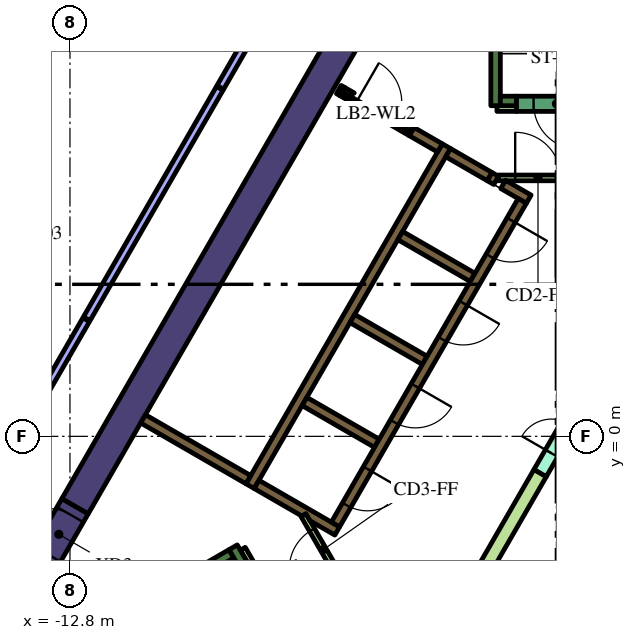
"""IFC4 building model, lengths in metres.
Left out: names, types, materials, properties, quantities, classifications, styles, units other than length and angle.
Written with IfcOpenShell. Run it as: python <this file> out.ifc"""

import sys

from ifc_helpers import new_model, si_unit, direction, frame, frame_2d, origin, place, context, subcontext, project, spatial, polyline, rectangle, outline, extrude, element, fill, save


model = new_model("IFC4")
c1 = context("Model", 3, precision=1e-05, world=origin(), true_north=direction((0.0, 1.0)))
c2 = subcontext(c1, "Body", "Model", "MODEL_VIEW")
j1 = project(units=[si_unit("LENGTHUNIT", "METRE"), si_unit("PLANEANGLEUNIT", "RADIAN")], contexts=[c1])
p1 = place(None, origin())
s1 = spatial("IfcSite", under=j1, at=p1, CompositionType="ELEMENT")
p2 = place(p1, origin())
s2 = spatial("IfcBuilding", under=s1, at=p2, CompositionType="ELEMENT")
p3 = place(p2, frame((0.0, 0.0, 179.4)))
s3 = spatial("IfcBuildingStorey", under=s2, at=p3, CompositionType="ELEMENT", Elevation=179.4)
p4 = place(p3, frame((-13.518, -3.314, 0.0), z_axis=(0.0, 0.0, 1.0), x_axis=(-0.499969377405, -0.866043083026, 0.0)))
e1 = element("IfcWall", 1, at=p4, inside=s3, PredefinedType="SOLIDWALL", context=c2, shape_type="SweptSolid", body=[
    extrude(rectangle(XDim=2.824, YDim=0.8, at=frame_2d((1.412, 0.0))), origin(), (0.0, 0.0, 1.0), 4.2),
])
p5 = place(p3, frame((-12.668, -1.842, 0.0), z_axis=(0.0, 0.0, 1.0), x_axis=(0.500003640647, 0.866023301845, 0.0)))
e2 = element("IfcWall", 2, at=p5, inside=s3, PredefinedType="SOLIDWALL", context=c2, shape_type="SweptSolid", body=[
    extrude(rectangle(XDim=15.858, YDim=0.8, at=frame_2d((7.929, 0.0))), origin(), (0.0, 0.0, 1.0), 4.2),
])
p6 = place(p3, frame((-1.6, 8.7, 0.0), z_axis=(0.0, 0.0, 1.0), x_axis=(0.0, 1.0, 0.0)))
e3 = element("IfcWall", 3, at=p6, inside=s3, PredefinedType="SOLIDWALL", context=c2, shape_type="SweptSolid", body=[
    extrude(rectangle(XDim=7.05, YDim=0.25, at=frame_2d((3.525, 0.0))), origin(), (0.0, 0.0, 1.0), 4.2),
])
p7 = place(p3, frame((-1.475, 8.825, 0.0), z_axis=(0.0, 0.0, 1.0), x_axis=(1.0, 0.0, 0.0)))
e4 = element("IfcWall", 4, at=p7, inside=s3, PredefinedType="SOLIDWALL", context=c2, shape_type="SweptSolid", body=[
    extrude(rectangle(XDim=0.425, YDim=0.25, at=frame_2d((0.212, 0.0))), origin(), (0.0, 0.0, 1.0), 4.2),
])
p8 = place(p3, frame((-14.44, -6.49, 0.0), z_axis=(0.0, 0.0, 1.0), x_axis=(0.866022966069, 0.500004222222, 0.0)))
e5 = element("IfcWall", 5, at=p8, inside=s3, PredefinedType="SOLIDWALL", context=c2, shape_type="SweptSolid", body=[
    extrude(rectangle(XDim=6.8, YDim=0.25, at=frame_2d((3.4, 0.0))), origin(), (0.0, 0.0, 1.0), 4.2),
])
p9 = place(p3, frame((-8.168, -3.503, 0.0), z_axis=(0.0, 0.0, 1.0), x_axis=(-0.499952099219, 0.866053057547, 0.0)))
e6 = element("IfcWall", 6, at=p9, inside=s3, PredefinedType="SOLIDWALL", context=c2, shape_type="SweptSolid", body=[
    extrude(rectangle(XDim=0.675, YDim=0.25, at=frame_2d((0.337, 0.0))), origin(), (0.0, 0.0, 1.0), 4.2),
])
p10 = place(p3, frame((-8.06, -1.311, 0.0), z_axis=(0.0, 0.0, 1.0), x_axis=(0.50000273126, 0.866023826885, 0.0)))
e7 = element("IfcWall", 7, at=p10, inside=s3, PredefinedType="SOLIDWALL", context=c2, shape_type="SweptSolid", body=[
    extrude(rectangle(XDim=10.33, YDim=0.25, at=frame_2d((5.165, 0.0))), origin(), (0.0, 0.0, 1.0), 4.2),
])
p11 = place(p3, frame((-1.758, 6.835, 0.0), z_axis=(0.0, 0.0, 1.0), x_axis=(0.865982457891, -0.500074377092, 0.0)))
e8 = element("IfcWall", 8, at=p11, inside=s3, PredefinedType="SOLIDWALL", context=c2, shape_type="SweptSolid", body=[
    extrude(rectangle(XDim=0.2, YDim=0.25, at=frame_2d((0.1, 0.0))), origin(), (0.0, 0.0, 1.0), 4.2),
])
p12 = place(p3, frame((-1.76, 6.836, 0.0), z_axis=(0.0, 0.0, 1.0), x_axis=(-0.865952863304, 0.500125622755, 0.0)))
e9 = element("IfcWall", 9, at=p12, inside=s3, PredefinedType="SOLIDWALL", context=c2, shape_type="SweptSolid", body=[
    extrude(rectangle(XDim=1.258, YDim=0.25, at=frame_2d((0.629, 0.0))), origin(), (0.0, 0.0, 1.0), 4.2),
])
p13 = place(p3, frame((-0.728, 6.24, 0.0), z_axis=(0.0, 0.0, 1.0), x_axis=(-0.865955664968, 0.500120771724, 0.0)))
e10 = element("IfcWall", 10, at=p13, inside=s3, PredefinedType="SOLIDWALL", context=c2, shape_type="SweptSolid", body=[
    extrude(rectangle(XDim=0.778, YDim=0.25, at=frame_2d((0.389, 0.0))), origin(), (0.0, 0.0, 1.0), 4.2),
])
for number, where, z_axis, x_axis in (
    (11, (-2.204, 4.182, 0.0), (0.0, 0.0, 1.0), (-0.866, 0.5, 0.0)),
    (12, (-5.369, 3.1, 0.0), (0.0, 0.0, 1.0), (0.866, -0.5, 0.0)),
    (13, (-4.724, -0.182, 0.0), (0.0, 0.0, 1.0), (-0.866, 0.5, 0.0)),
):
    element("IfcWall", number, at=place(p3, frame(where, z_axis=z_axis, x_axis=x_axis)), inside=s3, PredefinedType="SOLIDWALL", context=c2, shape_type="SweptSolid", body=[
        extrude(rectangle(XDim=2.2, YDim=0.25, at=frame_2d((1.1, 0.0))), origin(), (0.0, 0.0, 1.0), 4.2),
    ])
p14 = place(p3, origin())
e14 = element("IfcWall", 14, at=p14, inside=s3, PredefinedType="SOLIDWALL", context=c2, shape_type="SweptSolid", body=[
    extrude(outline(polyline([(-5.922, -2.257), (-5.922, -2.257), (-5.705, -2.382), (-5.83, -2.598), (-6.483, -2.221), (-6.591, -2.033), (-6.591, -2.033), (-6.7, -2.096), (-7.952, -1.373), (-7.827, -1.156), (-5.922, -2.257)])), origin(), (0.0, 0.0, 1.0), 4.2),
])
p15 = place(p3, frame((-8.106, -1.14, 0.0), z_axis=(0.0, 0.0, 1.0), x_axis=(-0.866008981251, 0.500028443584, 0.0)))
e15 = element("IfcWall", 15, at=p15, inside=s3, PredefinedType="SOLIDWALL", context=c2, shape_type="SweptSolid", body=[
    extrude(rectangle(XDim=3.2, YDim=0.25, at=frame_2d((1.6, 0.0))), origin(), (0.0, 0.0, 1.0), 4.2),
])
p16 = place(p3, frame((-5.725, 9.125, 0.0), z_axis=(0.0, 0.0, 1.0), x_axis=(0.866185586049, -0.49972245349, 0.0)))
e16 = element("IfcWall", 16, at=p16, inside=s3, PredefinedType="SOLIDWALL", context=c2, shape_type="SweptSolid", body=[
    extrude(rectangle(XDim=0.11, YDim=0.25, at=frame_2d((0.055, 0.0))), origin(), (0.0, 0.0, 1.0), 4.2),
])
p17 = place(p3, frame((-3.066, 7.59, 0.0), z_axis=(0.0, 0.0, 1.0), x_axis=(-0.866081358704, 0.49990307071, 0.0)))
e17 = element("IfcWall", 17, at=p17, inside=s3, PredefinedType="SOLIDWALL", context=c2, shape_type="SweptSolid", body=[
    extrude(rectangle(XDim=0.858, YDim=0.25, at=frame_2d((0.429, 0.0))), origin(), (0.0, 0.0, 1.0), 4.2),
])
e18 = element("IfcWall", 18, at=p14, inside=s3, PredefinedType="SOLIDWALL", context=c2, shape_type="SweptSolid", body=[
    extrude(outline(polyline([(-3.748, 8.128), (-3.813, 8.015), (-4.027, 8.139), (-4.017, 8.156), (-4.008, 8.173), (-4.0, 8.192), (-3.995, 8.21), (-3.991, 8.23), (-3.99, 8.25), (-3.99, 8.268), (-3.748, 8.128)])), origin(), (0.0, 0.0, 1.0), 4.2),
])
e19 = element("IfcWall", 19, at=p14, inside=s3, PredefinedType="SOLIDWALL", context=c2, shape_type="SweptSolid", body=[
    extrude(outline(polyline([(-5.689, 8.96), (-5.69, 8.961), (-5.565, 9.177), (-5.319, 9.035), (-5.335, 9.026), (-5.351, 9.015), (-5.366, 9.002), (-5.379, 8.988), (-5.392, 8.972), (-5.402, 8.956), (-5.412, 8.939), (-5.629, 9.064), (-5.629, 9.064), (-5.689, 8.96)])), origin(), (0.0, 0.0, 1.0), 4.2),
])
for number, where, z_axis, x_axis in (
    (20, (-8.252, -2.958, 0.0), (0.0, 0.0, 1.0), (0.5, -0.866, 0.0)),
    (21, (-1.564, 8.625, 0.0), (0.0, 0.0, 1.0), (1.0, 0.0, 0.0)),
):
    element("IfcWall", number, at=place(p3, frame(where, z_axis=z_axis, x_axis=x_axis)), inside=s3, PredefinedType="PARTITIONING", context=c2, shape_type="SweptSolid", body=[
        extrude(rectangle(XDim=0.514, YDim=0.15, at=frame_2d((0.257, 0.0))), origin(), (0.0, 0.0, 1.0), 3.15),
    ])
e22 = element("IfcWall", 22, at=p14, inside=s3, PredefinedType="PARTITIONING", context=c2, shape_type="SweptSolid", body=[
    extrude(outline(polyline([(-0.59, -0.872), (-0.265, -1.059), (-1.822, -3.756), (-2.147, -3.568), (-0.59, -0.872)])), origin(), (0.0, 0.0, 1.0), 3.15),
])
p18 = place(p3, frame((-0.898, 6.194, 0.0), z_axis=(0.0, 0.0, 1.0), x_axis=(-0.499996202215, -0.866027596426, 0.0)))
e23 = element("IfcWall", 23, at=p18, inside=s3, PredefinedType="SOLIDWALL", context=c2, shape_type="SweptSolid", body=[
    extrude(rectangle(XDim=9.83, YDim=0.25, at=frame_2d((4.915, 0.0))), origin(), (0.0, 0.0, 1.0), 4.2),
])
p19 = place(p18, frame((0.585, 0.0, 0.0)))
e24 = element("IfcOpeningElement", 24, at=p19, cuts=e23, PredefinedType="OPENING", context=c2, shape_type="SweptSolid", body=[
    extrude(rectangle(XDim=1.1, YDim=2.1, at=frame_2d((0.55, 1.05))), frame((0.0, 0.135, 0.0), z_axis=(0.0, -1.0, 0.0), x_axis=(1.0, 0.0, 0.0)), (0.0, 0.0, 1.0), 0.27),
])
p20 = place(p18, frame((3.105, 0.0, 0.0)))
e25 = element("IfcOpeningElement", 25, at=p20, cuts=e23, PredefinedType="OPENING", context=c2, shape_type="SweptSolid", body=[
    extrude(rectangle(XDim=1.1, YDim=2.1, at=frame_2d((0.55, 1.05))), frame((0.0, 0.135, 0.0), z_axis=(0.0, -1.0, 0.0), x_axis=(1.0, 0.0, 0.0)), (0.0, 0.0, 1.0), 0.27),
])
p21 = place(p18, frame((5.625, 0.0, 0.0)))
e26 = element("IfcOpeningElement", 26, at=p21, cuts=e23, PredefinedType="OPENING", context=c2, shape_type="SweptSolid", body=[
    extrude(rectangle(XDim=1.1, YDim=2.1, at=frame_2d((0.55, 1.05))), frame((0.0, 0.135, 0.0), z_axis=(0.0, -1.0, 0.0), x_axis=(1.0, 0.0, 0.0)), (0.0, 0.0, 1.0), 0.27),
])
p22 = place(p18, frame((8.145, 0.0, 0.0)))
e27 = element("IfcOpeningElement", 27, at=p22, cuts=e23, PredefinedType="OPENING", context=c2, shape_type="SweptSolid", body=[
    extrude(rectangle(XDim=1.1, YDim=2.1, at=frame_2d((0.55, 1.05))), frame((0.0, 0.135, 0.0), z_axis=(0.0, -1.0, 0.0), x_axis=(1.0, 0.0, 0.0)), (0.0, 0.0, 1.0), 0.27),
])
p23 = place(p3, frame((1.05, 8.75, 0.0), z_axis=(0.0, 0.0, 1.0), x_axis=(-1.0, 0.0, 0.0)))
e28 = element("IfcWall", 28, at=p23, inside=s3, PredefinedType="SOLIDWALL", context=c2, shape_type="SweptSolid", body=[
    extrude(rectangle(XDim=2.1, YDim=0.4, at=frame_2d((1.05, 0.0))), origin(), (0.0, 0.0, 1.0), 4.2),
])
p24 = place(p23, frame((0.45, 0.0, 0.0)))
e29 = element("IfcOpeningElement", 29, at=p24, cuts=e28, PredefinedType="OPENING", context=c2, shape_type="SweptSolid", body=[
    extrude(rectangle(XDim=1.2, YDim=2.1, at=frame_2d((0.6, 1.05))), frame((0.0, 0.21, 0.0), z_axis=(0.0, -1.0, 0.0), x_axis=(1.0, 0.0, 0.0)), (0.0, 0.0, 1.0), 0.42),
])
p25 = place(p3, frame((-0.427, -0.966, 0.0), z_axis=(0.0, 0.0, 1.0), x_axis=(0.49994051562, 0.866059744384, 0.0)))
e30 = element("IfcWall", 30, at=p25, inside=s3, PredefinedType="PARTITIONING", context=c2, shape_type="SweptSolid", body=[
    extrude(rectangle(XDim=2.1, YDim=0.375, at=frame_2d((1.05, 0.0))), origin(), (0.0, 0.0, 1.0), 3.15),
])
p26 = place(p25, frame((0.6, 0.0, 0.0)))
e31 = element("IfcOpeningElement", 31, at=p26, cuts=e30, PredefinedType="OPENING", context=c2, shape_type="SweptSolid", body=[
    extrude(rectangle(XDim=0.9, YDim=2.1, at=frame_2d((0.45, 1.05))), frame((0.0, 0.198, 0.0), z_axis=(0.0, -1.0, 0.0), x_axis=(1.0, 0.0, 0.0)), (0.0, 0.0, 1.0), 0.395),
])
p27 = place(p3, frame((-1.534, 6.8, 0.0), z_axis=(0.0, 0.0, 1.0), x_axis=(1.0, 0.0, 0.0)))
e32 = element("IfcWall", 32, at=p27, inside=s3, PredefinedType="PARTITIONING", context=c2, shape_type="SweptSolid", body=[
    extrude(rectangle(XDim=2.1, YDim=0.15, at=frame_2d((1.05, 0.0))), origin(), (0.0, 0.0, 1.0), 3.15),
])
p28 = place(p27, frame((0.45, 0.0, 0.0)))
e33 = element("IfcOpeningElement", 33, at=p28, cuts=e32, PredefinedType="OPENING", context=c2, shape_type="SweptSolid", body=[
    extrude(rectangle(XDim=1.2, YDim=2.1, at=frame_2d((0.6, 1.05))), frame((0.0, 0.085, 0.0), z_axis=(0.0, -1.0, 0.0), x_axis=(1.0, 0.0, 0.0)), (0.0, 0.0, 1.0), 0.17),
])
p29 = place(p3, frame((-5.606, -3.89, 0.0), z_axis=(0.0, 0.0, 1.0), x_axis=(-0.500027713859, 0.866009402589, 0.0)))
e34 = element("IfcWall", 34, at=p29, inside=s3, PredefinedType="PARTITIONING", context=c2, shape_type="SweptSolid", body=[
    extrude(rectangle(XDim=2.1, YDim=0.15, at=frame_2d((1.05, 0.0))), origin(), (0.0, 0.0, 1.0), 3.15),
])
p30 = place(p29, frame((0.45, 0.0, 0.0)))
e35 = element("IfcOpeningElement", 35, at=p30, cuts=e34, PredefinedType="OPENING", context=c2, shape_type="SweptSolid", body=[
    extrude(rectangle(XDim=1.2, YDim=2.1, at=frame_2d((0.6, 1.05))), frame((0.0, 0.085, 0.0), z_axis=(0.0, -1.0, 0.0), x_axis=(1.0, 0.0, 0.0)), (0.0, 0.0, 1.0), 0.17),
])
p31 = place(p3, frame((-5.659, 9.012, 0.0), z_axis=(0.0, 0.0, 1.0), x_axis=(0.866009402589, -0.500027713859, 0.0)))
e36 = element("IfcWall", 36, at=p31, inside=s3, PredefinedType="PARTITIONING", context=c2, shape_type="SweptSolid", body=[
    extrude(rectangle(XDim=2.1, YDim=0.12, at=frame_2d((1.05, 0.0))), origin(), (0.0, 0.0, 1.0), 3.15),
])
p32 = place(p31, frame((0.45, 0.0, 0.0)))
e37 = element("IfcOpeningElement", 37, at=p32, cuts=e36, PredefinedType="OPENING", context=c2, shape_type="SweptSolid", body=[
    extrude(rectangle(XDim=1.2, YDim=2.1, at=frame_2d((0.6, 1.05))), frame((0.0, 0.07, 0.0), z_axis=(0.0, -1.0, 0.0), x_axis=(1.0, 0.0, 0.0)), (0.0, 0.0, 1.0), 0.14),
])
p33 = place(p3, frame((-13.518, -3.314, 0.0), z_axis=(0.0, 0.0, 1.0), x_axis=(0.500000056704, 0.866025371046, 0.0)))
e38 = element("IfcWall", 38, at=p33, inside=s3, PredefinedType="SOLIDWALL", context=c2, shape_type="SweptSolid", body=[
    extrude(rectangle(XDim=1.7, YDim=0.8, at=frame_2d((0.85, 0.0))), origin(), (0.0, 0.0, 1.0), 4.2),
])
p34 = place(p33, frame((0.25, 0.0, 0.0)))
e39 = element("IfcOpeningElement", 39, at=p34, cuts=e38, PredefinedType="OPENING", context=c2, shape_type="SweptSolid", body=[
    extrude(rectangle(XDim=1.2, YDim=2.1, at=frame_2d((0.6, 1.05))), frame((0.0, 0.41, 0.0), z_axis=(0.0, -1.0, 0.0), x_axis=(1.0, 0.0, 0.0)), (0.0, 0.0, 1.0), 0.82),
])
p35 = place(p3, frame((-8.859, 9.156, 0.0), z_axis=(0.0, 0.0, 1.0), x_axis=(-0.500010275428, -0.866019471182, 0.0)))
e40 = element("IfcWall", 40, at=p35, inside=s3, PredefinedType="PARTITIONING", context=c2, shape_type="SweptSolid", body=[
    extrude(rectangle(XDim=7.0, YDim=0.2, at=frame_2d((3.5, 0.0))), origin(), (0.0, 0.0, 1.0), 3.15),
])
p36 = place(p3, frame((-12.374, 3.068, 0.0), z_axis=(0.0, 0.0, 1.0), x_axis=(-0.50000000053, -0.866025403479, 0.0)))
e41 = element("IfcWall", 41, at=p36, inside=s3, PredefinedType="PARTITIONING", context=c2, shape_type="SweptSolid", body=[
    extrude(rectangle(XDim=9.188, YDim=0.2, at=frame_2d((4.594, 0.0))), origin(), (0.0, 0.0, 1.0), 3.15),
])
p37 = place(p36, frame((4.1, 0.0, 0.0)))
e42 = element("IfcOpeningElement", 42, at=p37, cuts=e41, PredefinedType="OPENING", context=c2, shape_type="SweptSolid", body=[
    extrude(rectangle(XDim=1.0, YDim=2.1, at=frame_2d((0.5, 1.05))), frame((0.0, 0.11, 0.0), z_axis=(0.0, -1.0, 0.0), x_axis=(1.0, 0.0, 0.0)), (0.0, 0.0, 1.0), 0.22),
])
p38 = place(p3, frame((-7.453, 11.591, 0.0), z_axis=(0.0, 0.0, 1.0), x_axis=(-0.499980749935, -0.866036517529, 0.0)))
e43 = element("IfcWall", 43, at=p38, inside=s3, PredefinedType="PARTITIONING", context=c2, shape_type="SweptSolid", body=[
    extrude(rectangle(XDim=2.782, YDim=0.2, at=frame_2d((1.391, 0.0))), origin(), (0.0, 0.0, 1.0), 3.15),
])
p39 = place(p19, origin())
e44 = element("IfcDoor", 44, at=p39, inside=s3, OperationType="DOUBLE_DOOR_SLIDING", PredefinedType="DOOR", context=c2, shape_type="SweptSolid", body=[
    extrude(rectangle(XDim=1.1, YDim=2.1, at=frame_2d((0.55, 1.05))), frame((0.0, 0.025, 0.0), z_axis=(0.0, -1.0, 0.0), x_axis=(1.0, 0.0, 0.0)), (0.0, 0.0, 1.0), 0.05),
])
fill(e24, e44)
p40 = place(p20, origin())
e45 = element("IfcDoor", 45, at=p40, inside=s3, OperationType="DOUBLE_DOOR_SLIDING", PredefinedType="DOOR", context=c2, shape_type="SweptSolid", body=[
    extrude(rectangle(XDim=1.1, YDim=2.1, at=frame_2d((0.55, 1.05))), frame((0.0, 0.025, 0.0), z_axis=(0.0, -1.0, 0.0), x_axis=(1.0, 0.0, 0.0)), (0.0, 0.0, 1.0), 0.05),
])
fill(e25, e45)
p41 = place(p21, origin())
e46 = element("IfcDoor", 46, at=p41, inside=s3, OperationType="DOUBLE_DOOR_SLIDING", PredefinedType="DOOR", context=c2, shape_type="SweptSolid", body=[
    extrude(rectangle(XDim=1.1, YDim=2.1, at=frame_2d((0.55, 1.05))), frame((0.0, 0.025, 0.0), z_axis=(0.0, -1.0, 0.0), x_axis=(1.0, 0.0, 0.0)), (0.0, 0.0, 1.0), 0.05),
])
fill(e26, e46)
p42 = place(p22, origin())
e47 = element("IfcDoor", 47, at=p42, inside=s3, OperationType="DOUBLE_DOOR_SLIDING", PredefinedType="DOOR", context=c2, shape_type="SweptSolid", body=[
    extrude(rectangle(XDim=1.1, YDim=2.1, at=frame_2d((0.55, 1.05))), frame((0.0, 0.025, 0.0), z_axis=(0.0, -1.0, 0.0), x_axis=(1.0, 0.0, 0.0)), (0.0, 0.0, 1.0), 0.05),
])
fill(e27, e47)
p43 = place(p24, origin())
e48 = element("IfcDoor", 48, at=p43, inside=s3, OperationType="SINGLE_SWING_LEFT", PredefinedType="DOOR", context=c2, shape_type="SweptSolid", body=[
    extrude(rectangle(XDim=1.2, YDim=2.1, at=frame_2d((0.6, 1.05))), frame((0.0, 0.025, 0.0), z_axis=(0.0, -1.0, 0.0), x_axis=(1.0, 0.0, 0.0)), (0.0, 0.0, 1.0), 0.05),
])
fill(e29, e48)
p44 = place(p26, origin())
e49 = element("IfcDoor", 49, at=p44, inside=s3, OperationType="SINGLE_SWING_LEFT", PredefinedType="DOOR", context=c2, shape_type="SweptSolid", body=[
    extrude(rectangle(XDim=0.9, YDim=2.1, at=frame_2d((0.45, 1.05))), frame((0.0, 0.025, 0.0), z_axis=(0.0, -1.0, 0.0), x_axis=(1.0, 0.0, 0.0)), (0.0, 0.0, 1.0), 0.05),
])
fill(e31, e49)
p45 = place(p28, origin())
e50 = element("IfcDoor", 50, at=p45, inside=s3, OperationType="SINGLE_SWING_LEFT", PredefinedType="DOOR", context=c2, shape_type="SweptSolid", body=[
    extrude(rectangle(XDim=1.2, YDim=2.1, at=frame_2d((0.6, 1.05))), frame((0.0, 0.025, 0.0), z_axis=(0.0, -1.0, 0.0), x_axis=(1.0, 0.0, 0.0)), (0.0, 0.0, 1.0), 0.05),
])
fill(e33, e50)
p46 = place(p30, origin())
e51 = element("IfcDoor", 51, at=p46, inside=s3, OperationType="SINGLE_SWING_LEFT", PredefinedType="DOOR", context=c2, shape_type="SweptSolid", body=[
    extrude(rectangle(XDim=1.2, YDim=2.1, at=frame_2d((0.6, 1.05))), frame((0.0, 0.025, 0.0), z_axis=(0.0, -1.0, 0.0), x_axis=(1.0, 0.0, 0.0)), (0.0, 0.0, 1.0), 0.05),
])
fill(e35, e51)
p47 = place(p32, origin())
e52 = element("IfcDoor", 52, at=p47, inside=s3, OperationType="SINGLE_SWING_LEFT", PredefinedType="DOOR", context=c2, shape_type="SweptSolid", body=[
    extrude(rectangle(XDim=1.2, YDim=2.1, at=frame_2d((0.6, 1.05))), frame((0.0, 0.025, 0.0), z_axis=(0.0, -1.0, 0.0), x_axis=(1.0, 0.0, 0.0)), (0.0, 0.0, 1.0), 0.05),
])
fill(e37, e52)
p48 = place(p34, origin())
e53 = element("IfcDoor", 53, at=p48, inside=s3, OperationType="SINGLE_SWING_LEFT", PredefinedType="DOOR", context=c2, shape_type="SweptSolid", body=[
    extrude(rectangle(XDim=1.2, YDim=2.1, at=frame_2d((0.6, 1.05))), frame((0.0, 0.025, 0.0), z_axis=(0.0, -1.0, 0.0), x_axis=(1.0, 0.0, 0.0)), (0.0, 0.0, 1.0), 0.05),
])
fill(e39, e53)
save(model, sys.argv[1])
